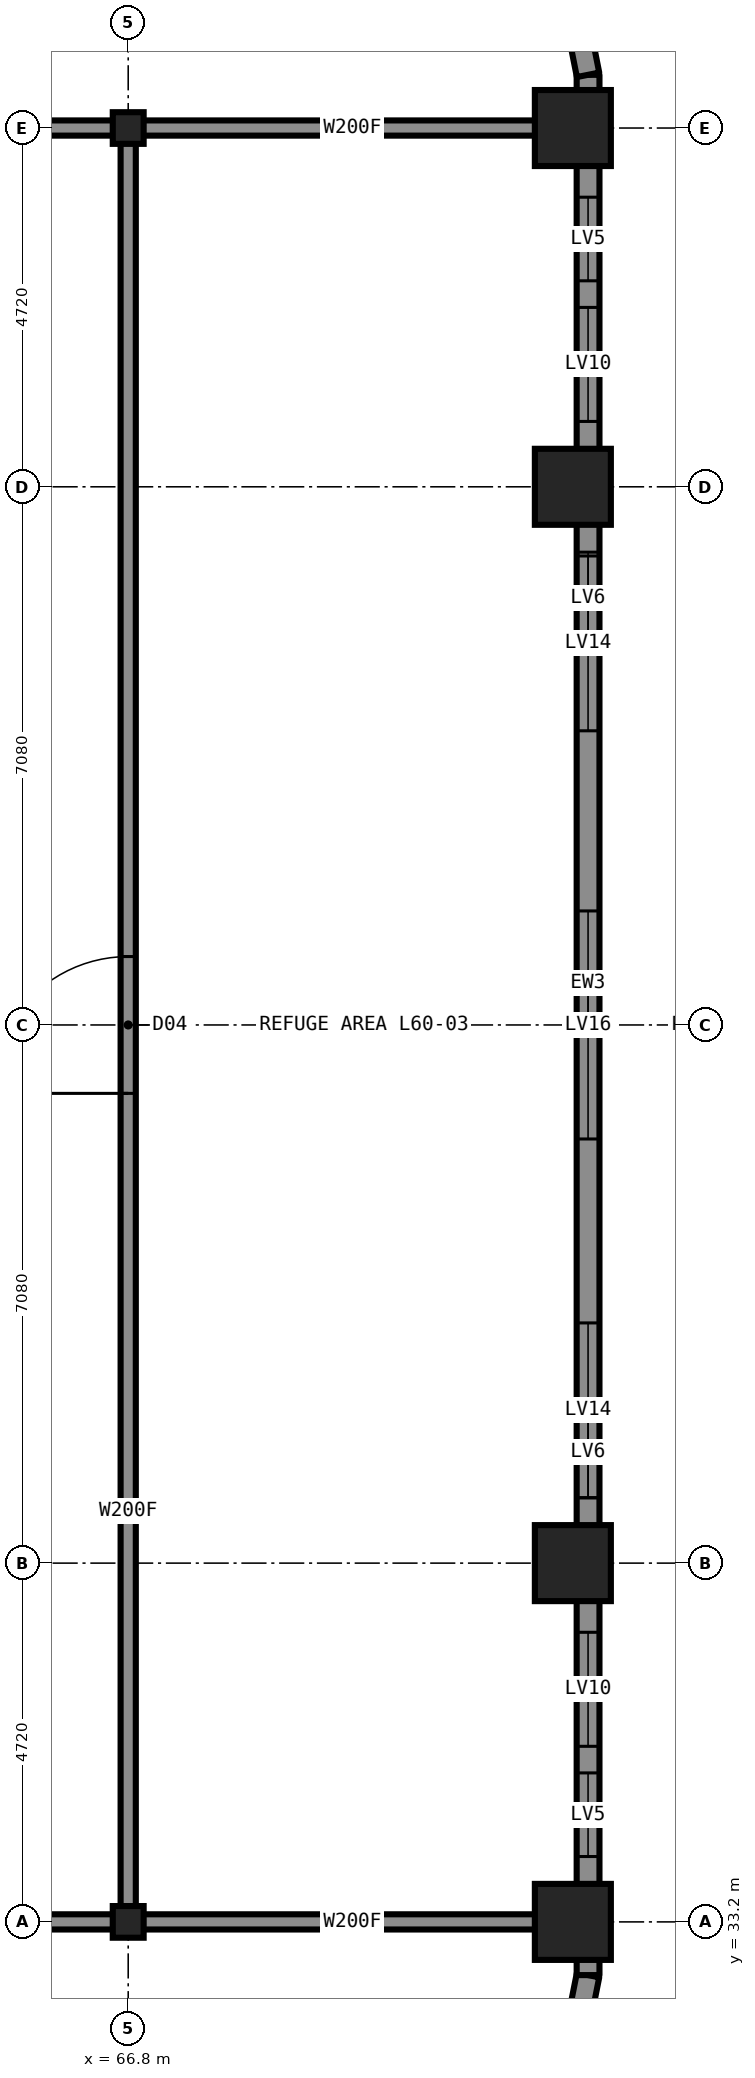
"""IFC4 building model, lengths in metres.
Left out: names, types, materials, properties, quantities, classifications, styles, units other than length and angle.
Written with IfcOpenShell. Run it as: python <this file> out.ifc"""

import sys

from ifc_helpers import new_model, si_unit, direction, frame, frame_2d, origin, origin_2d, place, context, subcontext, project, spatial, rectangle, hollow_rectangle, i_section, extrude, element, fill, save


model = new_model("IFC4")
c1 = context("Model", 3, precision=1e-05, world=origin(), true_north=direction((0.0, 1.0)))
c2 = subcontext(c1, "Body", "Model", "MODEL_VIEW")
j1 = project(units=[si_unit("LENGTHUNIT", "METRE"), si_unit("PLANEANGLEUNIT", "RADIAN")], contexts=[c1])
p1 = place(None, origin())
s1 = spatial("IfcSite", under=j1, at=p1, CompositionType="ELEMENT")
p2 = place(p1, origin())
s2 = spatial("IfcBuilding", under=s1, at=p2, CompositionType="ELEMENT")
p3 = place(p2, frame((0.0, 0.0, 221.3)))
s3 = spatial("IfcBuildingStorey", under=s2, at=p3, CompositionType="ELEMENT", Elevation=221.3)
for number, where, z_axis, x_axis in (
    (1, (72.65, 33.2, 0.0), (0.0, 0.0, 1.0), (1.0, 0.0, 0.0)),
    (2, (72.65, 37.92, 0.0), (0.0, 0.0, 1.0), (1.0, 0.0, 0.0)),
    (3, (72.65, 52.08, 0.0), (0.0, 0.0, 1.0), (1.0, 0.0, 0.0)),
    (4, (72.65, 56.8, 0.0), (0.0, 0.0, 1.0), (1.0, 0.0, 0.0)),
):
    element("IfcColumn", number, at=place(p3, frame(where, z_axis=z_axis, x_axis=x_axis)), inside=s3, PredefinedType="COLUMN", context=c2, shape_type="SweptSolid", body=[
        extrude(hollow_rectangle(XDim=1.0, YDim=1.0, WallThickness=0.06, at=origin_2d()), origin(), (0.0, 0.0, 1.0), 5.4),
    ])
for number, where, z_axis, x_axis in (
    (5, (66.8, 33.2, 0.0), (0.0, 0.0, 1.0), (1.0, 0.0, 0.0)),
    (6, (66.8, 56.8, 0.0), (0.0, 0.0, 1.0), (1.0, 0.0, 0.0)),
):
    element("IfcColumn", number, at=place(p3, frame(where, z_axis=z_axis, x_axis=x_axis)), inside=s3, PredefinedType="COLUMN", context=c2, shape_type="SweptSolid", body=[
        extrude(i_section(OverallWidth=0.406, OverallDepth=0.417, WebThickness=0.03, FlangeThickness=0.048, at=origin_2d()), origin(), (0.0, 0.0, 1.0), 5.4),
    ])
p4 = place(p3, frame((43.2, 33.2, 0.0), z_axis=(0.0, 0.0, 1.0), x_axis=(1.0, 0.0, 0.0)))
e7 = element("IfcWall", 7, at=p4, inside=s3, PredefinedType="PARTITIONING", context=c2, shape_type="SweptSolid", body=[
    extrude(rectangle(XDim=23.6, YDim=0.2, at=frame_2d((11.8, 0.0))), origin(), (0.0, 0.0, 1.0), 5.23),
])
p5 = place(p4, frame((5.3, 0.0, 0.0)))
e8 = element("IfcOpeningElement", 8, at=p5, cuts=e7, PredefinedType="OPENING", context=c2, shape_type="SweptSolid", body=[
    extrude(rectangle(XDim=1.0, YDim=2.1, at=frame_2d((0.5, 1.05))), frame((0.0, 0.11, 0.0), z_axis=(0.0, -1.0, 0.0), x_axis=(1.0, 0.0, 0.0)), (0.0, 0.0, 1.0), 0.22),
])
p6 = place(p3, frame((66.8, 33.2, 0.0), z_axis=(0.0, 0.0, 1.0), x_axis=(1.0, 0.0, 0.0)))
e9 = element("IfcWall", 9, at=p6, inside=s3, PredefinedType="PARTITIONING", context=c2, shape_type="SweptSolid", body=[
    extrude(rectangle(XDim=5.9, YDim=0.2, at=frame_2d((2.95, 0.0))), origin(), (0.0, 0.0, 1.0), 4.473),
])
p7 = place(p3, frame((43.2, 56.8, 0.0), z_axis=(0.0, 0.0, 1.0), x_axis=(1.0, 0.0, 0.0)))
e10 = element("IfcWall", 10, at=p7, inside=s3, PredefinedType="PARTITIONING", context=c2, shape_type="SweptSolid", body=[
    extrude(rectangle(XDim=23.6, YDim=0.2, at=frame_2d((11.8, 0.0))), origin(), (0.0, 0.0, 1.0), 5.23),
])
p8 = place(p7, frame((5.3, 0.0, 0.0)))
e11 = element("IfcOpeningElement", 11, at=p8, cuts=e10, PredefinedType="OPENING", context=c2, shape_type="SweptSolid", body=[
    extrude(rectangle(XDim=1.0, YDim=2.1, at=frame_2d((0.5, 1.05))), frame((0.0, 0.11, 0.0), z_axis=(0.0, -1.0, 0.0), x_axis=(1.0, 0.0, 0.0)), (0.0, 0.0, 1.0), 0.22),
])
p9 = place(p3, frame((66.8, 56.8, 0.0), z_axis=(0.0, 0.0, 1.0), x_axis=(1.0, 0.0, 0.0)))
e12 = element("IfcWall", 12, at=p9, inside=s3, PredefinedType="PARTITIONING", context=c2, shape_type="SweptSolid", body=[
    extrude(rectangle(XDim=5.9, YDim=0.2, at=frame_2d((2.95, 0.0))), origin(), (0.0, 0.0, 1.0), 4.473),
])
p10 = place(p3, frame((66.8, 33.2, 0.0), z_axis=(0.0, 0.0, 1.0), x_axis=(0.0, 1.0, 0.0)))
e13 = element("IfcWall", 13, at=p10, inside=s3, PredefinedType="PARTITIONING", context=c2, shape_type="SweptSolid", body=[
    extrude(rectangle(XDim=23.6, YDim=0.2, at=frame_2d((11.8, 0.0))), origin(), (0.0, 0.0, 1.0), 5.23),
])
p11 = place(p10, frame((10.9, 0.0, 0.0)))
e14 = element("IfcOpeningElement", 14, at=p11, cuts=e13, PredefinedType="OPENING", context=c2, shape_type="SweptSolid", body=[
    extrude(rectangle(XDim=1.8, YDim=2.2, at=frame_2d((0.9, 1.1))), frame((0.0, 0.11, 0.0), z_axis=(0.0, -1.0, 0.0), x_axis=(1.0, 0.0, 0.0)), (0.0, 0.0, 1.0), 0.22),
])
p12 = place(p3, frame((72.443, 30.453, 0.0), z_axis=(0.0, 0.0, 1.0), x_axis=(0.195081421501, 0.980787050784, 0.0)))
e15 = element("IfcWall", 15, at=p12, inside=s3, PredefinedType="SOLIDWALL", context=c2, shape_type="SweptSolid", body=[
    extrude(rectangle(XDim=2.087, YDim=0.3, at=frame_2d((1.044, 0.0))), origin(), (0.0, 0.0, 1.0), 5.23),
])
p13 = place(p12, frame((0.444, 0.0, 0.6)))
e16 = element("IfcOpeningElement", 16, at=p13, cuts=e15, PredefinedType="OPENING", context=c2, shape_type="SweptSolid", body=[
    extrude(rectangle(XDim=1.2, YDim=1.9, at=frame_2d((0.6, 0.95))), frame((0.0, 0.16, 0.0), z_axis=(0.0, -1.0, 0.0), x_axis=(1.0, 0.0, 0.0)), (0.0, 0.0, 1.0), 0.32),
])
p14 = place(p3, frame((72.85, 32.5, 0.0), z_axis=(0.0, 0.0, 1.0), x_axis=(0.0, 1.0, 0.0)))
e17 = element("IfcWall", 17, at=p14, inside=s3, PredefinedType="SOLIDWALL", context=c2, shape_type="SweptSolid", body=[
    extrude(rectangle(XDim=25.0, YDim=0.3, at=frame_2d((12.5, 0.0))), origin(), (0.0, 0.0, 1.0), 4.43),
])
p15 = place(p14, frame((3.01, 0.0, 2.4)))
e18 = element("IfcOpeningElement", 18, at=p15, cuts=e17, PredefinedType="OPENING", context=c2, shape_type="SweptSolid", body=[
    extrude(rectangle(XDim=1.5, YDim=1.4, at=frame_2d((0.75, 0.7))), frame((0.0, 0.16, 0.0), z_axis=(0.0, -1.0, 0.0), x_axis=(1.0, 0.0, 0.0)), (0.0, 0.0, 1.0), 0.32),
])
p16 = place(p14, frame((6.28, 0.0, 2.0)))
e19 = element("IfcOpeningElement", 19, at=p16, cuts=e17, PredefinedType="OPENING", context=c2, shape_type="SweptSolid", body=[
    extrude(rectangle(XDim=2.3, YDim=1.8, at=frame_2d((1.15, 0.9))), frame((0.0, 0.16, 0.0), z_axis=(0.0, -1.0, 0.0), x_axis=(1.0, 0.0, 0.0)), (0.0, 0.0, 1.0), 0.32),
])
p17 = place(p14, frame((11.0, 0.0, 0.6)))
e20 = element("IfcOpeningElement", 20, at=p17, cuts=e17, PredefinedType="OPENING", context=c2, shape_type="SweptSolid", body=[
    extrude(rectangle(XDim=3.0, YDim=2.0, at=frame_2d((1.5, 1.0))), frame((0.0, 0.16, 0.0), z_axis=(0.0, -1.0, 0.0), x_axis=(1.0, 0.0, 0.0)), (0.0, 0.0, 1.0), 0.32),
])
p18 = place(p14, frame((16.37, 0.0, 2.0)))
e21 = element("IfcOpeningElement", 21, at=p18, cuts=e17, PredefinedType="OPENING", context=c2, shape_type="SweptSolid", body=[
    extrude(rectangle(XDim=2.3, YDim=1.8, at=frame_2d((1.15, 0.9))), frame((0.0, 0.16, 0.0), z_axis=(0.0, -1.0, 0.0), x_axis=(1.0, 0.0, 0.0)), (0.0, 0.0, 1.0), 0.32),
])
p19 = place(p14, frame((20.44, 0.0, 2.4)))
e22 = element("IfcOpeningElement", 22, at=p19, cuts=e17, PredefinedType="OPENING", context=c2, shape_type="SweptSolid", body=[
    extrude(rectangle(XDim=1.5, YDim=1.4, at=frame_2d((0.75, 0.7))), frame((0.0, 0.16, 0.0), z_axis=(0.0, -1.0, 0.0), x_axis=(1.0, 0.0, 0.0)), (0.0, 0.0, 1.0), 0.32),
])
p20 = place(p14, frame((1.56, 0.0, 0.6)))
e23 = element("IfcOpeningElement", 23, at=p20, cuts=e17, PredefinedType="OPENING", context=c2, shape_type="SweptSolid", body=[
    extrude(rectangle(XDim=1.1, YDim=1.0, at=frame_2d((0.55, 0.5))), frame((0.0, 0.16, 0.0), z_axis=(0.0, -1.0, 0.0), x_axis=(1.0, 0.0, 0.0)), (0.0, 0.0, 1.0), 0.32),
])
p21 = place(p14, frame((6.28, 0.0, 1.2)))
e24 = element("IfcOpeningElement", 24, at=p21, cuts=e17, PredefinedType="OPENING", context=c2, shape_type="SweptSolid", body=[
    extrude(rectangle(XDim=1.2, YDim=0.8, at=frame_2d((0.6, 0.4))), frame((0.0, 0.16, 0.0), z_axis=(0.0, -1.0, 0.0), x_axis=(1.0, 0.0, 0.0)), (0.0, 0.0, 1.0), 0.32),
])
p22 = place(p14, frame((17.52, 0.0, 1.2)))
e25 = element("IfcOpeningElement", 25, at=p22, cuts=e17, PredefinedType="OPENING", context=c2, shape_type="SweptSolid", body=[
    extrude(rectangle(XDim=1.2, YDim=0.8, at=frame_2d((0.6, 0.4))), frame((0.0, 0.16, 0.0), z_axis=(0.0, -1.0, 0.0), x_axis=(1.0, 0.0, 0.0)), (0.0, 0.0, 1.0), 0.32),
])
p23 = place(p14, frame((22.29, 0.0, 0.6)))
e26 = element("IfcOpeningElement", 26, at=p23, cuts=e17, PredefinedType="OPENING", context=c2, shape_type="SweptSolid", body=[
    extrude(rectangle(XDim=1.1, YDim=1.0, at=frame_2d((0.55, 0.5))), frame((0.0, 0.16, 0.0), z_axis=(0.0, -1.0, 0.0), x_axis=(1.0, 0.0, 0.0)), (0.0, 0.0, 1.0), 0.32),
])
p24 = place(p3, frame((72.85, 57.5, 0.0), z_axis=(0.0, 0.0, 1.0), x_axis=(-0.195081421501, 0.980787050784, 0.0)))
e27 = element("IfcWall", 27, at=p24, inside=s3, PredefinedType="SOLIDWALL", context=c2, shape_type="SweptSolid", body=[
    extrude(rectangle(XDim=2.087, YDim=0.3, at=frame_2d((1.044, 0.0))), origin(), (0.0, 0.0, 1.0), 5.23),
])
p25 = place(p24, frame((0.444, 0.0, 0.6)))
e28 = element("IfcOpeningElement", 28, at=p25, cuts=e27, PredefinedType="OPENING", context=c2, shape_type="SweptSolid", body=[
    extrude(rectangle(XDim=1.2, YDim=1.9, at=frame_2d((0.6, 0.95))), frame((0.0, 0.16, 0.0), z_axis=(0.0, -1.0, 0.0), x_axis=(1.0, 0.0, 0.0)), (0.0, 0.0, 1.0), 0.32),
])
p26 = place(p11, origin())
e29 = element("IfcDoor", 29, at=p26, inside=s3, OperationType="DOUBLE_DOOR_SINGLE_SWING", PredefinedType="DOOR", context=c2, shape_type="SweptSolid", body=[
    extrude(rectangle(XDim=1.8, YDim=2.2, at=frame_2d((0.9, 1.1))), frame((0.0, 0.025, 0.0), z_axis=(0.0, -1.0, 0.0), x_axis=(1.0, 0.0, 0.0)), (0.0, 0.0, 1.0), 0.05),
])
fill(e14, e29)
p27 = place(p15, origin())
e30 = element("IfcWindow", 30, at=p27, inside=s3, PartitioningType="SINGLE_PANEL", PredefinedType="USERDEFINED", context=c2, shape_type="SweptSolid", body=[
    extrude(rectangle(XDim=1.5, YDim=1.4, at=frame_2d((0.75, 0.7))), frame((0.0, 0.03, 0.0), z_axis=(0.0, -1.0, 0.0), x_axis=(1.0, 0.0, 0.0)), (0.0, 0.0, 1.0), 0.06),
])
fill(e18, e30)
p28 = place(p16, origin())
e31 = element("IfcWindow", 31, at=p28, inside=s3, PartitioningType="SINGLE_PANEL", PredefinedType="USERDEFINED", context=c2, shape_type="SweptSolid", body=[
    extrude(rectangle(XDim=2.3, YDim=1.8, at=frame_2d((1.15, 0.9))), frame((0.0, 0.03, 0.0), z_axis=(0.0, -1.0, 0.0), x_axis=(1.0, 0.0, 0.0)), (0.0, 0.0, 1.0), 0.06),
])
fill(e19, e31)
p29 = place(p17, origin())
e32 = element("IfcWindow", 32, at=p29, inside=s3, PartitioningType="SINGLE_PANEL", PredefinedType="USERDEFINED", context=c2, shape_type="SweptSolid", body=[
    extrude(rectangle(XDim=3.0, YDim=2.0, at=frame_2d((1.5, 1.0))), frame((0.0, 0.03, 0.0), z_axis=(0.0, -1.0, 0.0), x_axis=(1.0, 0.0, 0.0)), (0.0, 0.0, 1.0), 0.06),
])
fill(e20, e32)
p30 = place(p18, origin())
e33 = element("IfcWindow", 33, at=p30, inside=s3, PartitioningType="SINGLE_PANEL", PredefinedType="USERDEFINED", context=c2, shape_type="SweptSolid", body=[
    extrude(rectangle(XDim=2.3, YDim=1.8, at=frame_2d((1.15, 0.9))), frame((0.0, 0.03, 0.0), z_axis=(0.0, -1.0, 0.0), x_axis=(1.0, 0.0, 0.0)), (0.0, 0.0, 1.0), 0.06),
])
fill(e21, e33)
p31 = place(p19, origin())
e34 = element("IfcWindow", 34, at=p31, inside=s3, PartitioningType="SINGLE_PANEL", PredefinedType="USERDEFINED", context=c2, shape_type="SweptSolid", body=[
    extrude(rectangle(XDim=1.5, YDim=1.4, at=frame_2d((0.75, 0.7))), frame((0.0, 0.03, 0.0), z_axis=(0.0, -1.0, 0.0), x_axis=(1.0, 0.0, 0.0)), (0.0, 0.0, 1.0), 0.06),
])
fill(e22, e34)
p32 = place(p20, origin())
e35 = element("IfcWindow", 35, at=p32, inside=s3, PartitioningType="SINGLE_PANEL", PredefinedType="USERDEFINED", context=c2, shape_type="SweptSolid", body=[
    extrude(rectangle(XDim=1.1, YDim=1.0, at=frame_2d((0.55, 0.5))), frame((0.0, 0.03, 0.0), z_axis=(0.0, -1.0, 0.0), x_axis=(1.0, 0.0, 0.0)), (0.0, 0.0, 1.0), 0.06),
])
fill(e23, e35)
p33 = place(p21, origin())
e36 = element("IfcWindow", 36, at=p33, inside=s3, PartitioningType="SINGLE_PANEL", PredefinedType="USERDEFINED", context=c2, shape_type="SweptSolid", body=[
    extrude(rectangle(XDim=1.2, YDim=0.8, at=frame_2d((0.6, 0.4))), frame((0.0, 0.03, 0.0), z_axis=(0.0, -1.0, 0.0), x_axis=(1.0, 0.0, 0.0)), (0.0, 0.0, 1.0), 0.06),
])
fill(e24, e36)
p34 = place(p22, origin())
e37 = element("IfcWindow", 37, at=p34, inside=s3, PartitioningType="SINGLE_PANEL", PredefinedType="USERDEFINED", context=c2, shape_type="SweptSolid", body=[
    extrude(rectangle(XDim=1.2, YDim=0.8, at=frame_2d((0.6, 0.4))), frame((0.0, 0.03, 0.0), z_axis=(0.0, -1.0, 0.0), x_axis=(1.0, 0.0, 0.0)), (0.0, 0.0, 1.0), 0.06),
])
fill(e25, e37)
p35 = place(p23, origin())
e38 = element("IfcWindow", 38, at=p35, inside=s3, PartitioningType="SINGLE_PANEL", PredefinedType="USERDEFINED", context=c2, shape_type="SweptSolid", body=[
    extrude(rectangle(XDim=1.1, YDim=1.0, at=frame_2d((0.55, 0.5))), frame((0.0, 0.03, 0.0), z_axis=(0.0, -1.0, 0.0), x_axis=(1.0, 0.0, 0.0)), (0.0, 0.0, 1.0), 0.06),
])
fill(e26, e38)
save(model, sys.argv[1])
